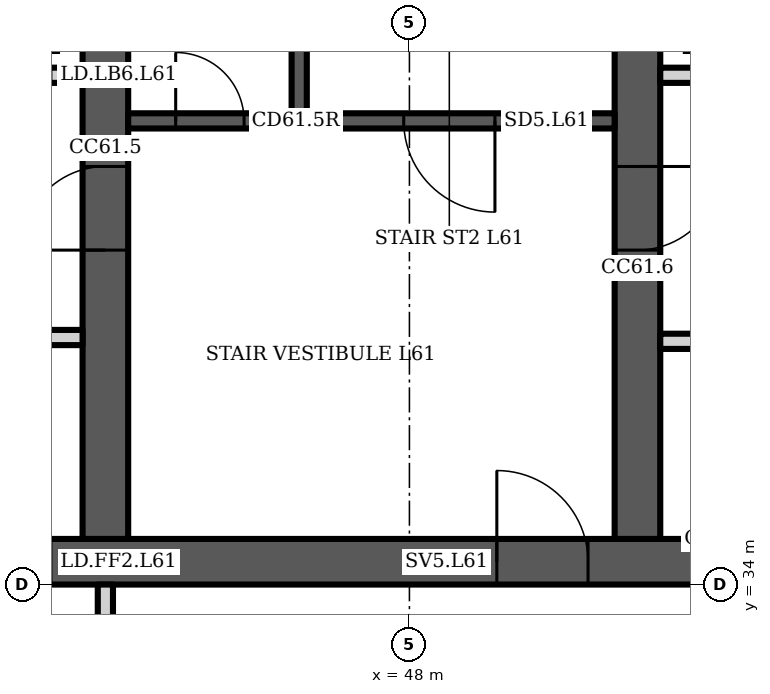
"""IFC4 building model, lengths in metres.
Left out: names, types, materials, properties, quantities, classifications, styles, units other than length and angle.
Written with IfcOpenShell. Run it as: python <this file> out.ifc"""

import sys

from ifc_helpers import new_model, si_unit, direction, frame, frame_2d, origin, place, context, subcontext, project, spatial, polyline, rectangle, outline, extrude, element, fill, save


model = new_model("IFC4")
c1 = context("Model", 3, precision=1e-05, world=origin(), true_north=direction((0.0, 1.0)))
c2 = subcontext(c1, "Body", "Model", "MODEL_VIEW")
j1 = project(units=[si_unit("LENGTHUNIT", "METRE"), si_unit("PLANEANGLEUNIT", "RADIAN")], contexts=[c1])
p1 = place(None, origin())
s1 = spatial("IfcSite", under=j1, at=p1, CompositionType="ELEMENT")
p2 = place(p1, origin())
s2 = spatial("IfcBuilding", under=s1, at=p2, CompositionType="ELEMENT")
p3 = place(p2, frame((0.0, 0.0, 243.1)))
s3 = spatial("IfcBuildingStorey", under=s2, at=p3, CompositionType="ELEMENT", Elevation=243.1)
p4 = place(p3, frame((23.0, 34.3, 0.0), z_axis=(0.0, 0.0, 1.0), x_axis=(1.0, 0.0, 0.0)))
e1 = element("IfcWall", 1, at=p4, inside=s3, PredefinedType="SHEAR", context=c2, shape_type="SweptSolid", body=[
    extrude(rectangle(XDim=35.0, YDim=0.6, at=frame_2d((17.5, 0.0))), origin(), (0.0, 0.0, 1.0), 3.6),
])
p5 = place(p4, frame((0.65, 0.0, 0.0)))
e2 = element("IfcOpeningElement", 2, at=p5, cuts=e1, PredefinedType="OPENING", context=c2, shape_type="SweptSolid", body=[
    extrude(rectangle(XDim=1.2, YDim=2.1, at=frame_2d((0.6, 1.05))), frame((0.0, 0.31, 0.0), z_axis=(0.0, -1.0, 0.0), x_axis=(1.0, 0.0, 0.0)), (0.0, 0.0, 1.0), 0.62),
])
p6 = place(p4, frame((7.717, 0.0, 0.0)))
e3 = element("IfcOpeningElement", 3, at=p6, cuts=e1, PredefinedType="OPENING", context=c2, shape_type="SweptSolid", body=[
    extrude(rectangle(XDim=1.1, YDim=2.1, at=frame_2d((0.55, 1.05))), frame((0.0, 0.31, 0.0), z_axis=(0.0, -1.0, 0.0), x_axis=(1.0, 0.0, 0.0)), (0.0, 0.0, 1.0), 0.62),
])
p7 = place(p4, frame((12.183, 0.0, 0.0)))
e4 = element("IfcOpeningElement", 4, at=p7, cuts=e1, PredefinedType="OPENING", context=c2, shape_type="SweptSolid", body=[
    extrude(rectangle(XDim=1.1, YDim=2.1, at=frame_2d((0.55, 1.05))), frame((0.0, 0.31, 0.0), z_axis=(0.0, -1.0, 0.0), x_axis=(1.0, 0.0, 0.0)), (0.0, 0.0, 1.0), 0.62),
])
p8 = place(p4, frame((9.8, 0.0, 0.0)))
e5 = element("IfcOpeningElement", 5, at=p8, cuts=e1, PredefinedType="OPENING", context=c2, shape_type="SweptSolid", body=[
    extrude(rectangle(XDim=1.4, YDim=2.1, at=frame_2d((0.7, 1.05))), frame((0.0, 0.31, 0.0), z_axis=(0.0, -1.0, 0.0), x_axis=(1.0, 0.0, 0.0)), (0.0, 0.0, 1.0), 0.62),
])
p9 = place(p4, frame((14.717, 0.0, 0.0)))
e6 = element("IfcOpeningElement", 6, at=p9, cuts=e1, PredefinedType="OPENING", context=c2, shape_type="SweptSolid", body=[
    extrude(rectangle(XDim=1.1, YDim=2.1, at=frame_2d((0.55, 1.05))), frame((0.0, 0.31, 0.0), z_axis=(0.0, -1.0, 0.0), x_axis=(1.0, 0.0, 0.0)), (0.0, 0.0, 1.0), 0.62),
])
p10 = place(p4, frame((16.95, 0.0, 0.0)))
e7 = element("IfcOpeningElement", 7, at=p10, cuts=e1, PredefinedType="OPENING", context=c2, shape_type="SweptSolid", body=[
    extrude(rectangle(XDim=1.1, YDim=2.1, at=frame_2d((0.55, 1.05))), frame((0.0, 0.31, 0.0), z_axis=(0.0, -1.0, 0.0), x_axis=(1.0, 0.0, 0.0)), (0.0, 0.0, 1.0), 0.62),
])
p11 = place(p4, frame((19.183, 0.0, 0.0)))
e8 = element("IfcOpeningElement", 8, at=p11, cuts=e1, PredefinedType="OPENING", context=c2, shape_type="SweptSolid", body=[
    extrude(rectangle(XDim=1.1, YDim=2.1, at=frame_2d((0.55, 1.05))), frame((0.0, 0.31, 0.0), z_axis=(0.0, -1.0, 0.0), x_axis=(1.0, 0.0, 0.0)), (0.0, 0.0, 1.0), 0.62),
])
p12 = place(p4, frame((26.15, 0.0, 0.0)))
e9 = element("IfcOpeningElement", 9, at=p12, cuts=e1, PredefinedType="OPENING", context=c2, shape_type="SweptSolid", body=[
    extrude(rectangle(XDim=1.2, YDim=2.1, at=frame_2d((0.6, 1.05))), frame((0.0, 0.31, 0.0), z_axis=(0.0, -1.0, 0.0), x_axis=(1.0, 0.0, 0.0)), (0.0, 0.0, 1.0), 0.62),
])
p13 = place(p4, frame((28.767, 0.0, 0.0)))
e10 = element("IfcOpeningElement", 10, at=p13, cuts=e1, PredefinedType="OPENING", context=c2, shape_type="SweptSolid", body=[
    extrude(rectangle(XDim=1.0, YDim=2.1, at=frame_2d((0.5, 1.05))), frame((0.0, 0.31, 0.0), z_axis=(0.0, -1.0, 0.0), x_axis=(1.0, 0.0, 0.0)), (0.0, 0.0, 1.0), 0.62),
])
p14 = place(p4, frame((33.083, 0.0, 0.0)))
e11 = element("IfcOpeningElement", 11, at=p14, cuts=e1, PredefinedType="OPENING", context=c2, shape_type="SweptSolid", body=[
    extrude(rectangle(XDim=1.0, YDim=2.1, at=frame_2d((0.5, 1.05))), frame((0.0, 0.31, 0.0), z_axis=(0.0, -1.0, 0.0), x_axis=(1.0, 0.0, 0.0)), (0.0, 0.0, 1.0), 0.62),
])
p15 = place(p4, frame((30.8, 0.0, 0.0)))
e12 = element("IfcOpeningElement", 12, at=p15, cuts=e1, PredefinedType="OPENING", context=c2, shape_type="SweptSolid", body=[
    extrude(rectangle(XDim=1.4, YDim=2.1, at=frame_2d((0.7, 1.05))), frame((0.0, 0.31, 0.0), z_axis=(0.0, -1.0, 0.0), x_axis=(1.0, 0.0, 0.0)), (0.0, 0.0, 1.0), 0.62),
])
p16 = place(p3, frame((44.0, 34.6, 0.0), z_axis=(0.0, 0.0, 1.0), x_axis=(0.0, 1.0, 0.0)))
e13 = element("IfcWall", 13, at=p16, inside=s3, PredefinedType="SHEAR", context=c2, shape_type="SweptSolid", body=[
    extrude(rectangle(XDim=14.784, YDim=0.6, at=frame_2d((7.392, 0.0))), origin(), (0.0, 0.0, 1.0), 3.6),
])
p17 = place(p16, frame((11.608, 0.0, 0.0)))
e14 = element("IfcOpeningElement", 14, at=p17, cuts=e13, PredefinedType="OPENING", context=c2, shape_type="SweptSolid", body=[
    extrude(rectangle(XDim=1.0, YDim=2.1, at=frame_2d((0.5, 1.05))), frame((0.0, 0.31, 0.0), z_axis=(0.0, -1.0, 0.0), x_axis=(1.0, 0.0, 0.0)), (0.0, 0.0, 1.0), 0.62),
])
p18 = place(p16, frame((3.8, 0.0, 0.0)))
e15 = element("IfcOpeningElement", 15, at=p18, cuts=e13, PredefinedType="OPENING", context=c2, shape_type="SweptSolid", body=[
    extrude(rectangle(XDim=1.1, YDim=2.1, at=frame_2d((0.55, 1.05))), frame((0.0, 0.31, 0.0), z_axis=(0.0, -1.0, 0.0), x_axis=(1.0, 0.0, 0.0)), (0.0, 0.0, 1.0), 0.62),
])
p19 = place(p3, frame((51.0, 34.6, 0.0), z_axis=(0.0, 0.0, 1.0), x_axis=(0.0, 1.0, 0.0)))
e16 = element("IfcWall", 16, at=p19, inside=s3, PredefinedType="SHEAR", context=c2, shape_type="SweptSolid", body=[
    extrude(rectangle(XDim=14.171, YDim=0.6, at=frame_2d((7.085, 0.0))), origin(), (0.0, 0.0, 1.0), 3.6),
])
p20 = place(p19, frame((3.8, 0.0, 0.0)))
e17 = element("IfcOpeningElement", 17, at=p20, cuts=e16, PredefinedType="OPENING", context=c2, shape_type="SweptSolid", body=[
    extrude(rectangle(XDim=1.1, YDim=2.1, at=frame_2d((0.55, 1.05))), frame((0.0, 0.31, 0.0), z_axis=(0.0, -1.0, 0.0), x_axis=(1.0, 0.0, 0.0)), (0.0, 0.0, 1.0), 0.62),
])
p21 = place(p3, frame((37.3, 40.7, 0.0), z_axis=(0.0, 0.0, 1.0), x_axis=(1.0, 0.0, 0.0)))
e18 = element("IfcWall", 18, at=p21, inside=s3, PredefinedType="PARTITIONING", context=c2, shape_type="SweptSolid", body=[
    extrude(rectangle(XDim=6.4, YDim=0.2, at=frame_2d((3.2, 0.0))), origin(), (0.0, 0.0, 1.0), 3.2),
])
p22 = place(p21, frame((0.417, 0.0, 0.0)))
e19 = element("IfcOpeningElement", 19, at=p22, cuts=e18, PredefinedType="OPENING", context=c2, shape_type="SweptSolid", body=[
    extrude(rectangle(XDim=1.1, YDim=2.1, at=frame_2d((0.55, 1.05))), frame((0.0, 0.11, 0.0), z_axis=(0.0, -1.0, 0.0), x_axis=(1.0, 0.0, 0.0)), (0.0, 0.0, 1.0), 0.22),
])
p23 = place(p21, frame((2.65, 0.0, 0.0)))
e20 = element("IfcOpeningElement", 20, at=p23, cuts=e18, PredefinedType="OPENING", context=c2, shape_type="SweptSolid", body=[
    extrude(rectangle(XDim=1.1, YDim=2.1, at=frame_2d((0.55, 1.05))), frame((0.0, 0.11, 0.0), z_axis=(0.0, -1.0, 0.0), x_axis=(1.0, 0.0, 0.0)), (0.0, 0.0, 1.0), 0.22),
])
p24 = place(p21, frame((4.883, 0.0, 0.0)))
e21 = element("IfcOpeningElement", 21, at=p24, cuts=e18, PredefinedType="OPENING", context=c2, shape_type="SweptSolid", body=[
    extrude(rectangle(XDim=1.1, YDim=2.1, at=frame_2d((0.55, 1.05))), frame((0.0, 0.11, 0.0), z_axis=(0.0, -1.0, 0.0), x_axis=(1.0, 0.0, 0.0)), (0.0, 0.0, 1.0), 0.22),
])
p25 = place(p3, frame((0.0, 0.0, -0.0)))
e22 = element("IfcWall", 22, at=p25, inside=s3, PredefinedType="PARTITIONING", context=c2, shape_type="SweptSolid", body=[
    extrude(outline(polyline([(41.567, 37.1), (39.433, 37.1), (39.433, 34.6), (39.233, 34.6), (39.233, 37.45), (37.3, 37.45), (37.3, 37.65), (39.233, 37.65), (39.433, 37.65), (39.433, 37.3), (41.567, 37.3), (41.567, 37.35), (41.767, 37.35), (43.7, 37.35), (43.7, 37.15), (41.767, 37.15), (41.767, 34.6), (41.567, 34.6), (41.567, 37.1)])), origin(), (0.0, 0.0, 1.0), 3.2),
])
p26 = place(p3, frame((0.0, 0.0, -0.0)))
e23 = element("IfcWall", 23, at=p26, inside=s3, PredefinedType="PARTITIONING", context=c2, shape_type="SweptSolid", body=[
    extrude(outline(polyline([(39.433, 40.8), (39.233, 40.8), (39.233, 43.8), (37.3, 43.8), (37.3, 44.0), (43.7, 44.0), (43.7, 43.8), (41.767, 43.8), (41.767, 40.8), (41.567, 40.8), (41.567, 43.8), (39.433, 43.8), (39.433, 40.8)])), origin(), (0.0, 0.0, 1.0), 3.2),
])
p27 = place(p3, frame((44.3, 40.1, 0.0), z_axis=(0.0, 0.0, 1.0), x_axis=(1.0, 0.0, 0.0)))
e24 = element("IfcWall", 24, at=p27, inside=s3, PredefinedType="SHEAR", context=c2, shape_type="SweptSolid", body=[
    extrude(rectangle(XDim=6.4, YDim=0.2, at=frame_2d((3.2, 0.0))), origin(), (0.0, 0.0, 1.0), 3.2),
])
p28 = place(p27, frame((3.625, 0.0, 0.0)))
e25 = element("IfcOpeningElement", 25, at=p28, cuts=e24, PredefinedType="OPENING", context=c2, shape_type="SweptSolid", body=[
    extrude(rectangle(XDim=1.2, YDim=2.1, at=frame_2d((0.6, 1.05))), frame((0.0, 0.11, 0.0), z_axis=(0.0, -1.0, 0.0), x_axis=(1.0, 0.0, 0.0)), (0.0, 0.0, 1.0), 0.22),
])
p29 = place(p27, frame((0.625, 0.0, 0.0)))
e26 = element("IfcOpeningElement", 26, at=p29, cuts=e24, PredefinedType="OPENING", context=c2, shape_type="SweptSolid", body=[
    extrude(rectangle(XDim=0.9, YDim=2.1, at=frame_2d((0.45, 1.05))), frame((0.0, 0.11, 0.0), z_axis=(0.0, -1.0, 0.0), x_axis=(1.0, 0.0, 0.0)), (0.0, 0.0, 1.0), 0.22),
])
p30 = place(p3, frame((46.55, 40.2, 0.0), z_axis=(0.0, 0.0, 1.0), x_axis=(0.0, 1.0, 0.0)))
e27 = element("IfcWall", 27, at=p30, inside=s3, PredefinedType="SHEAR", context=c2, shape_type="SweptSolid", body=[
    extrude(rectangle(XDim=7.2, YDim=0.2, at=frame_2d((3.6, 0.0))), origin(), (0.0, 0.0, 1.0), 3.2),
])
p31 = place(p3, frame((51.3, 37.2, 0.0), z_axis=(0.0, 0.0, 1.0), x_axis=(1.0, 0.0, 0.0)))
e28 = element("IfcWall", 28, at=p31, inside=s3, PredefinedType="PARTITIONING", context=c2, shape_type="SweptSolid", body=[
    extrude(rectangle(XDim=1.933, YDim=0.2, at=frame_2d((0.967, 0.0))), origin(), (0.0, 0.0, 1.0), 3.2),
])
p32 = place(p31, frame((0.467, 0.0, 0.0)))
e29 = element("IfcOpeningElement", 29, at=p32, cuts=e28, PredefinedType="OPENING", context=c2, shape_type="SweptSolid", body=[
    extrude(rectangle(XDim=1.0, YDim=2.1, at=frame_2d((0.5, 1.05))), frame((0.0, 0.11, 0.0), z_axis=(0.0, -1.0, 0.0), x_axis=(1.0, 0.0, 0.0)), (0.0, 0.0, 1.0), 0.22),
])
p33 = place(p3, frame((51.3, 40.7, 0.0), z_axis=(0.0, 0.0, 1.0), x_axis=(1.0, 0.0, 0.0)))
e30 = element("IfcWall", 30, at=p33, inside=s3, PredefinedType="PARTITIONING", context=c2, shape_type="SweptSolid", body=[
    extrude(rectangle(XDim=6.1, YDim=0.2, at=frame_2d((3.05, 0.0))), origin(), (0.0, 0.0, 1.0), 3.2),
])
p34 = place(p33, frame((0.417, 0.0, 0.0)))
e31 = element("IfcOpeningElement", 31, at=p34, cuts=e30, PredefinedType="OPENING", context=c2, shape_type="SweptSolid", body=[
    extrude(rectangle(XDim=1.1, YDim=2.1, at=frame_2d((0.55, 1.05))), frame((0.0, 0.11, 0.0), z_axis=(0.0, -1.0, 0.0), x_axis=(1.0, 0.0, 0.0)), (0.0, 0.0, 1.0), 0.22),
])
p35 = place(p33, frame((3.617, 0.0, 0.0)))
e32 = element("IfcOpeningElement", 32, at=p35, cuts=e30, PredefinedType="OPENING", context=c2, shape_type="SweptSolid", body=[
    extrude(rectangle(XDim=1.0, YDim=2.1, at=frame_2d((0.5, 1.05))), frame((0.0, 0.11, 0.0), z_axis=(0.0, -1.0, 0.0), x_axis=(1.0, 0.0, 0.0)), (0.0, 0.0, 1.0), 0.22),
])
p36 = place(p3, frame((44.0, 30.5, 0.0), z_axis=(0.0, 0.0, 1.0), x_axis=(0.0, 1.0, 0.0)))
e33 = element("IfcWall", 33, at=p36, inside=s3, PredefinedType="PARTITIONING", context=c2, shape_type="SweptSolid", body=[
    extrude(rectangle(XDim=3.5, YDim=0.2, at=frame_2d((1.75, 0.0))), origin(), (0.0, 0.0, 1.0), 3.2),
])
p37 = place(p36, frame((1.2, 0.0, 0.0)))
e34 = element("IfcOpeningElement", 34, at=p37, cuts=e33, PredefinedType="OPENING", context=c2, shape_type="SweptSolid", body=[
    extrude(rectangle(XDim=1.1, YDim=2.1, at=frame_2d((0.55, 1.05))), frame((0.0, 0.11, 0.0), z_axis=(0.0, -1.0, 0.0), x_axis=(1.0, 0.0, 0.0)), (0.0, 0.0, 1.0), 0.22),
])
p38 = place(p28, origin())
e35 = element("IfcDoor", 35, at=p38, inside=s3, OperationType="SINGLE_SWING_RIGHT", PredefinedType="DOOR", context=c2, shape_type="SweptSolid", body=[
    extrude(rectangle(XDim=1.2, YDim=2.1, at=frame_2d((0.6, 1.05))), frame((0.0, 0.025, 0.0), z_axis=(0.0, -1.0, 0.0), x_axis=(1.0, 0.0, 0.0)), (0.0, 0.0, 1.0), 0.05),
])
fill(e25, e35)
p39 = place(p29, origin())
e36 = element("IfcDoor", 36, at=p39, inside=s3, OperationType="SINGLE_SWING_LEFT", PredefinedType="DOOR", context=c2, shape_type="SweptSolid", body=[
    extrude(rectangle(XDim=0.9, YDim=2.1, at=frame_2d((0.45, 1.05))), frame((0.0, 0.025, 0.0), z_axis=(0.0, -1.0, 0.0), x_axis=(1.0, 0.0, 0.0)), (0.0, 0.0, 1.0), 0.05),
])
fill(e26, e36)
p40 = place(p12, origin())
e37 = element("IfcDoor", 37, at=p40, inside=s3, OperationType="SINGLE_SWING_LEFT", PredefinedType="DOOR", context=c2, shape_type="SweptSolid", body=[
    extrude(rectangle(XDim=1.2, YDim=2.1, at=frame_2d((0.6, 1.05))), frame((0.0, 0.025, 0.0), z_axis=(0.0, -1.0, 0.0), x_axis=(1.0, 0.0, 0.0)), (0.0, 0.0, 1.0), 0.05),
])
fill(e9, e37)
p41 = place(p18, origin())
e38 = element("IfcDoor", 38, at=p41, inside=s3, OperationType="SINGLE_SWING_LEFT", PredefinedType="DOOR", context=c2, shape_type="SweptSolid", body=[
    extrude(rectangle(XDim=1.1, YDim=2.1, at=frame_2d((0.55, 1.05))), frame((0.0, 0.025, 0.0), z_axis=(0.0, -1.0, 0.0), x_axis=(1.0, 0.0, 0.0)), (0.0, 0.0, 1.0), 0.05),
])
fill(e15, e38)
p42 = place(p20, origin())
e39 = element("IfcDoor", 39, at=p42, inside=s3, OperationType="SINGLE_SWING_RIGHT", PredefinedType="DOOR", context=c2, shape_type="SweptSolid", body=[
    extrude(rectangle(XDim=1.1, YDim=2.1, at=frame_2d((0.55, 1.05))), frame((0.0, 0.025, 0.0), z_axis=(0.0, -1.0, 0.0), x_axis=(1.0, 0.0, 0.0)), (0.0, 0.0, 1.0), 0.05),
])
fill(e17, e39)
save(model, sys.argv[1])
